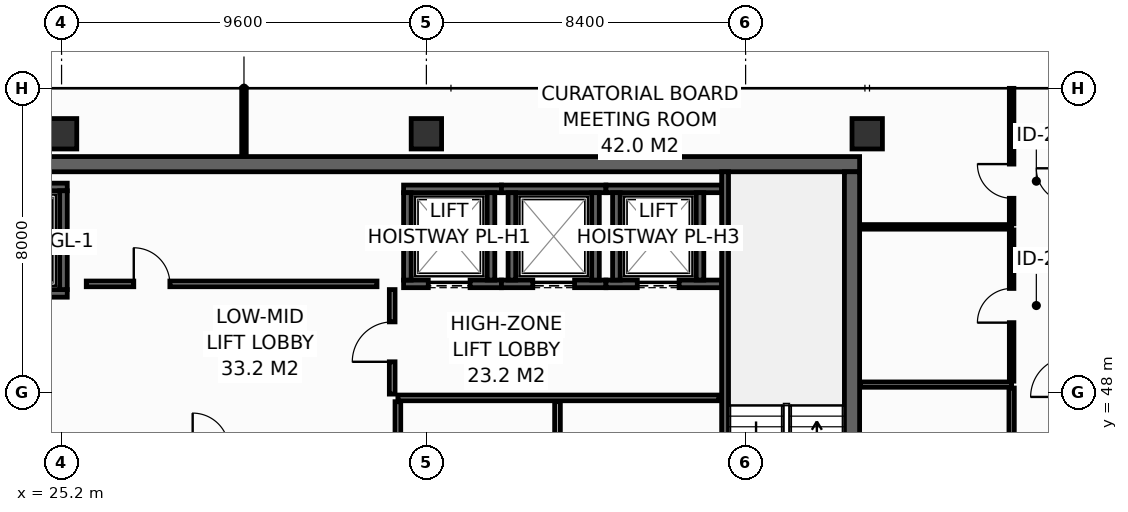
"""IFC4 building model, lengths in metres.
Left out: names, types, materials, properties, quantities, classifications, styles, units other than length and angle.
Written with IfcOpenShell. Run it as: python <this file> out.ifc"""

import sys

from ifc_helpers import new_model, si_unit, direction, frame, frame_2d, origin, origin_2d, place, context, subcontext, project, spatial, rectangle, hollow_rectangle, extrude, element, fill, save


model = new_model("IFC4")
c1 = context("Model", 3, precision=1e-05, world=origin(), true_north=direction((0.0, 1.0)))
c2 = subcontext(c1, "Body", "Model", "MODEL_VIEW")
j1 = project(units=[si_unit("LENGTHUNIT", "METRE"), si_unit("PLANEANGLEUNIT", "RADIAN")], contexts=[c1])
p1 = place(None, origin())
s1 = spatial("IfcSite", under=j1, at=p1, CompositionType="ELEMENT")
p2 = place(p1, origin())
s2 = spatial("IfcBuilding", under=s1, at=p2, CompositionType="ELEMENT")
p3 = place(p2, frame((0.0, 0.0, 249.6)))
s3 = spatial("IfcBuildingStorey", under=s2, at=p3, CompositionType="ELEMENT", Elevation=249.6)
p4 = place(p3, frame((13.7, 54.0, 0.0), z_axis=(0.0, 0.0, 1.0), x_axis=(1.0, 0.0, 0.0)))
e1 = element("IfcWall", 1, at=p4, inside=s3, PredefinedType="SHEAR", context=c2, shape_type="SweptSolid", body=[
    extrude(rectangle(XDim=32.5, YDim=0.4, at=frame_2d((16.25, 0.0))), origin(), (0.0, 0.0, 1.0), 3.35),
])
p5 = place(p3, frame((46.0, 43.4, 0.0), z_axis=(0.0, 0.0, 1.0), x_axis=(0.0, 1.0, 0.0)))
e2 = element("IfcWall", 2, at=p5, inside=s3, PredefinedType="SHEAR", context=c2, shape_type="SweptSolid", body=[
    extrude(rectangle(XDim=10.4, YDim=0.4, at=frame_2d((5.2, 0.0))), origin(), (0.0, 0.0, 1.0), 3.35),
])
for number, where, z_axis, x_axis in (
    (3, (25.2, 54.8, 0.0), (0.0, 0.0, 1.0), (1.0, 0.0, 0.0)),
    (4, (34.8, 54.8, 0.0), (0.0, 0.0, 1.0), (1.0, 0.0, 0.0)),
    (5, (46.4, 54.8, 0.0), (0.0, 0.0, 1.0), (1.0, 0.0, 0.0)),
):
    element("IfcColumn", number, at=place(p3, frame(where, z_axis=z_axis, x_axis=x_axis)), inside=s3, PredefinedType="COLUMN", context=c2, shape_type="SweptSolid", body=[
        extrude(hollow_rectangle(XDim=0.8, YDim=0.8, WallThickness=0.036, at=origin_2d()), origin(), (0.0, 0.0, 1.0), 3.8),
    ])
p6 = place(p3, frame((22.5, 50.6, 0.0), z_axis=(0.0, 0.0, 1.0), x_axis=(1.0, 0.0, 0.0)))
e6 = element("IfcWall", 6, at=p6, inside=s3, PredefinedType="SHEAR", context=c2, shape_type="SweptSolid", body=[
    extrude(rectangle(XDim=2.85, YDim=0.2, at=frame_2d((1.425, 0.0))), origin(), (0.0, 0.0, 1.0), 3.35),
])
p7 = place(p6, frame((0.925, 0.0, 0.0)))
e7 = element("IfcOpeningElement", 7, at=p7, cuts=e6, PredefinedType="OPENING", context=c2, shape_type="SweptSolid", body=[
    extrude(rectangle(XDim=1.25, YDim=2.3, at=frame_2d((0.625, 1.15))), frame((0.0, 0.11, 0.0), z_axis=(0.0, -1.0, 0.0), x_axis=(1.0, 0.0, 0.0)), (0.0, 0.0, 1.0), 0.22),
])
p8 = place(p3, frame((22.5, 53.4, 0.0), z_axis=(0.0, 0.0, 1.0), x_axis=(1.0, 0.0, 0.0)))
e8 = element("IfcWall", 8, at=p8, inside=s3, PredefinedType="SHEAR", context=c2, shape_type="SweptSolid", body=[
    extrude(rectangle(XDim=2.85, YDim=0.2, at=frame_2d((1.425, 0.0))), origin(), (0.0, 0.0, 1.0), 3.35),
])
p9 = place(p3, frame((25.25, 50.7, 0.0), z_axis=(0.0, 0.0, 1.0), x_axis=(0.0, 1.0, 0.0)))
e9 = element("IfcWall", 9, at=p9, inside=s3, PredefinedType="SHEAR", context=c2, shape_type="SweptSolid", body=[
    extrude(rectangle(XDim=2.6, YDim=0.2, at=frame_2d((1.3, 0.0))), origin(), (0.0, 0.0, 1.0), 3.35),
])
p10 = place(p3, frame((34.2, 50.85, 0.0), z_axis=(0.0, 0.0, 1.0), x_axis=(1.0, 0.0, 0.0)))
e10 = element("IfcWall", 10, at=p10, inside=s3, PredefinedType="SHEAR", context=c2, shape_type="SweptSolid", body=[
    extrude(rectangle(XDim=2.575, YDim=0.2, at=frame_2d((1.288, 0.0))), origin(), (0.0, 0.0, 1.0), 3.35),
])
p11 = place(p10, frame((0.65, 0.0, 0.0)))
e11 = element("IfcOpeningElement", 11, at=p11, cuts=e10, PredefinedType="OPENING", context=c2, shape_type="SweptSolid", body=[
    extrude(rectangle(XDim=1.1, YDim=2.2, at=frame_2d((0.55, 1.1))), frame((0.0, 0.11, 0.0), z_axis=(0.0, -1.0, 0.0), x_axis=(1.0, 0.0, 0.0)), (0.0, 0.0, 1.0), 0.22),
])
p12 = place(p3, frame((34.2, 53.35, 0.0), z_axis=(0.0, 0.0, 1.0), x_axis=(1.0, 0.0, 0.0)))
e12 = element("IfcWall", 12, at=p12, inside=s3, PredefinedType="SHEAR", context=c2, shape_type="SweptSolid", body=[
    extrude(rectangle(XDim=2.575, YDim=0.2, at=frame_2d((1.288, 0.0))), origin(), (0.0, 0.0, 1.0), 3.35),
])
for number, where, z_axis, x_axis in (
    (13, (34.3, 50.95, 0.0), (0.0, 0.0, 1.0), (0.0, 1.0, 0.0)),
    (14, (36.5, 50.95, 0.0), (0.0, 0.0, 1.0), (0.0, 1.0, 0.0)),
):
    element("IfcWall", number, at=place(p3, frame(where, z_axis=z_axis, x_axis=x_axis)), inside=s3, PredefinedType="SHEAR", context=c2, shape_type="SweptSolid", body=[
        extrude(rectangle(XDim=2.3, YDim=0.2, at=frame_2d((1.15, 0.0))), origin(), (0.0, 0.0, 1.0), 3.35),
    ])
p13 = place(p3, frame((36.775, 50.85, 0.0), z_axis=(0.0, 0.0, 1.0), x_axis=(1.0, 0.0, 0.0)))
e15 = element("IfcWall", 15, at=p13, inside=s3, PredefinedType="SHEAR", context=c2, shape_type="SweptSolid", body=[
    extrude(rectangle(XDim=2.75, YDim=0.2, at=frame_2d((1.375, 0.0))), origin(), (0.0, 0.0, 1.0), 3.35),
])
p14 = place(p13, frame((0.825, 0.0, 0.0)))
e16 = element("IfcOpeningElement", 16, at=p14, cuts=e15, PredefinedType="OPENING", context=c2, shape_type="SweptSolid", body=[
    extrude(rectangle(XDim=1.1, YDim=2.2, at=frame_2d((0.55, 1.1))), frame((0.0, 0.11, 0.0), z_axis=(0.0, -1.0, 0.0), x_axis=(1.0, 0.0, 0.0)), (0.0, 0.0, 1.0), 0.22),
])
p15 = place(p3, frame((36.775, 53.35, 0.0), z_axis=(0.0, 0.0, 1.0), x_axis=(1.0, 0.0, 0.0)))
e17 = element("IfcWall", 17, at=p15, inside=s3, PredefinedType="SHEAR", context=c2, shape_type="SweptSolid", body=[
    extrude(rectangle(XDim=2.75, YDim=0.2, at=frame_2d((1.375, 0.0))), origin(), (0.0, 0.0, 1.0), 3.35),
])
for number, where, z_axis, x_axis in (
    (18, (37.05, 50.95, 0.0), (0.0, 0.0, 1.0), (0.0, 1.0, 0.0)),
    (19, (39.25, 50.95, 0.0), (0.0, 0.0, 1.0), (0.0, 1.0, 0.0)),
):
    element("IfcWall", number, at=place(p3, frame(where, z_axis=z_axis, x_axis=x_axis)), inside=s3, PredefinedType="SHEAR", context=c2, shape_type="SweptSolid", body=[
        extrude(rectangle(XDim=2.3, YDim=0.2, at=frame_2d((1.15, 0.0))), origin(), (0.0, 0.0, 1.0), 3.35),
    ])
p16 = place(p3, frame((39.525, 50.85, 0.0), z_axis=(0.0, 0.0, 1.0), x_axis=(1.0, 0.0, 0.0)))
e20 = element("IfcWall", 20, at=p16, inside=s3, PredefinedType="SHEAR", context=c2, shape_type="SweptSolid", body=[
    extrude(rectangle(XDim=3.045, YDim=0.2, at=frame_2d((1.522, 0.0))), origin(), (0.0, 0.0, 1.0), 3.35),
])
p17 = place(p16, frame((0.825, 0.0, 0.0)))
e21 = element("IfcOpeningElement", 21, at=p17, cuts=e20, PredefinedType="OPENING", context=c2, shape_type="SweptSolid", body=[
    extrude(rectangle(XDim=1.1, YDim=2.2, at=frame_2d((0.55, 1.1))), frame((0.0, 0.11, 0.0), z_axis=(0.0, -1.0, 0.0), x_axis=(1.0, 0.0, 0.0)), (0.0, 0.0, 1.0), 0.22),
])
p18 = place(p3, frame((39.525, 53.35, 0.0), z_axis=(0.0, 0.0, 1.0), x_axis=(1.0, 0.0, 0.0)))
e22 = element("IfcWall", 22, at=p18, inside=s3, PredefinedType="SHEAR", context=c2, shape_type="SweptSolid", body=[
    extrude(rectangle(XDim=3.045, YDim=0.2, at=frame_2d((1.522, 0.0))), origin(), (0.0, 0.0, 1.0), 3.35),
])
for number, where, z_axis, x_axis in (
    (23, (39.8, 50.95, 0.0), (0.0, 0.0, 1.0), (0.0, 1.0, 0.0)),
    (24, (42.0, 50.95, 0.0), (0.0, 0.0, 1.0), (0.0, 1.0, 0.0)),
):
    element("IfcWall", number, at=place(p3, frame(where, z_axis=z_axis, x_axis=x_axis)), inside=s3, PredefinedType="SHEAR", context=c2, shape_type="SweptSolid", body=[
        extrude(rectangle(XDim=2.3, YDim=0.2, at=frame_2d((1.15, 0.0))), origin(), (0.0, 0.0, 1.0), 3.35),
    ])
p19 = place(p3, frame((42.66, 53.8, 0.0), z_axis=(0.0, 0.0, 1.0), x_axis=(0.0, -1.0, 0.0)))
e25 = element("IfcWall", 25, at=p19, inside=s3, PredefinedType="SHEAR", context=c2, shape_type="SweptSolid", body=[
    extrude(rectangle(XDim=10.4, YDim=0.18, at=frame_2d((5.2, 0.0))), origin(), (0.0, 0.0, 1.0), 3.35),
])
p20 = place(p19, frame((8.99, 0.0, 0.0)))
e26 = element("IfcOpeningElement", 26, at=p20, cuts=e25, PredefinedType="OPENING", context=c2, shape_type="SweptSolid", body=[
    extrude(rectangle(XDim=1.1, YDim=2.15, at=frame_2d((0.55, 1.075))), frame((0.0, 0.1, 0.0), z_axis=(0.0, -1.0, 0.0), x_axis=(1.0, 0.0, 0.0)), (0.0, 0.0, 1.0), 0.2),
])
p21 = place(p3, frame((33.9, 47.95, 0.0), z_axis=(0.0, 0.0, 1.0), x_axis=(0.0, 1.0, 0.0)))
e27 = element("IfcWall", 27, at=p21, inside=s3, PredefinedType="PARTITIONING", context=c2, shape_type="SweptSolid", body=[
    extrude(rectangle(XDim=2.75, YDim=0.15, at=frame_2d((1.375, 0.0))), origin(), (0.0, 0.0, 1.0), 3.35),
])
p22 = place(p21, frame((0.85, 0.0, 0.0)))
e28 = element("IfcOpeningElement", 28, at=p22, cuts=e27, PredefinedType="OPENING", context=c2, shape_type="SweptSolid", body=[
    extrude(rectangle(XDim=1.05, YDim=2.15, at=frame_2d((0.525, 1.075))), frame((0.0, 0.085, 0.0), z_axis=(0.0, -1.0, 0.0), x_axis=(1.0, 0.0, 0.0)), (0.0, 0.0, 1.0), 0.17),
])
p23 = place(p3, frame((34.05, 47.85, 0.0), z_axis=(0.0, 0.0, 1.0), x_axis=(1.0, 0.0, 0.0)))
e29 = element("IfcWall", 29, at=p23, inside=s3, PredefinedType="PARTITIONING", context=c2, shape_type="SweptSolid", body=[
    extrude(rectangle(XDim=8.45, YDim=0.15, at=frame_2d((4.225, 0.0))), origin(), (0.0, 0.0, 1.0), 3.35),
])
for number, where, z_axis, x_axis in (
    (30, (38.25, 45.22, 0.0), (0.0, 0.0, 1.0), (0.0, 1.0, 0.0)),
    (31, (34.05, 45.22, 0.0), (0.0, 0.0, 1.0), (0.0, 1.0, 0.0)),
):
    element("IfcWall", number, at=place(p3, frame(where, z_axis=z_axis, x_axis=x_axis)), inside=s3, PredefinedType="PARTITIONING", context=c2, shape_type="SweptSolid", body=[
        extrude(rectangle(XDim=2.53, YDim=0.15, at=frame_2d((1.265, 0.0))), origin(), (0.0, 0.0, 1.0), 3.35),
    ])
p24 = place(p3, frame((25.85, 50.85, 0.0), z_axis=(0.0, 0.0, 1.0), x_axis=(1.0, 0.0, 0.0)))
e32 = element("IfcWall", 32, at=p24, inside=s3, PredefinedType="PARTITIONING", context=c2, shape_type="SweptSolid", body=[
    extrude(rectangle(XDim=7.65, YDim=0.15, at=frame_2d((3.825, 0.0))), origin(), (0.0, 0.0, 1.0), 3.35),
])
p25 = place(p24, frame((1.25, 0.0, 0.0)))
e33 = element("IfcOpeningElement", 33, at=p25, cuts=e32, PredefinedType="OPENING", context=c2, shape_type="SweptSolid", body=[
    extrude(rectangle(XDim=0.95, YDim=2.15, at=frame_2d((0.475, 1.075))), frame((0.0, 0.085, 0.0), z_axis=(0.0, -1.0, 0.0), x_axis=(1.0, 0.0, 0.0)), (0.0, 0.0, 1.0), 0.17),
])
p26 = place(p3, frame((46.22, 48.2, 0.0), z_axis=(0.0, 0.0, 1.0), x_axis=(1.0, 0.0, 0.0)))
e34 = element("IfcWall", 34, at=p26, inside=s3, PredefinedType="PARTITIONING", context=c2, shape_type="SweptSolid", body=[
    extrude(rectangle(XDim=3.98, YDim=0.14, at=frame_2d((1.99, 0.0))), origin(), (0.0, 0.0, 1.0), 3.35),
])
p27 = place(p3, frame((50.2, 41.24, 0.0), z_axis=(0.0, 0.0, 1.0), x_axis=(0.0, 1.0, 0.0)))
e35 = element("IfcWall", 35, at=p27, inside=s3, PredefinedType="PARTITIONING", context=c2, shape_type="SweptSolid", body=[
    extrude(rectangle(XDim=6.87, YDim=0.14, at=frame_2d((3.435, 0.0))), origin(), (0.0, 0.0, 1.0), 2.747),
])
p28 = place(p27, frame((2.985, 0.0, 0.0)))
e36 = element("IfcOpeningElement", 36, at=p28, cuts=e35, PredefinedType="OPENING", context=c2, shape_type="SweptSolid", body=[
    extrude(rectangle(XDim=0.9, YDim=2.1, at=frame_2d((0.45, 1.05))), frame((0.0, 0.08, 0.0), z_axis=(0.0, -1.0, 0.0), x_axis=(1.0, 0.0, 0.0)), (0.0, 0.0, 1.0), 0.16),
])
p29 = place(p3, frame((46.22, 52.35, 0.0), z_axis=(0.0, 0.0, 1.0), x_axis=(1.0, 0.0, 0.0)))
e37 = element("IfcWall", 37, at=p29, inside=s3, PredefinedType="PARTITIONING", context=c2, shape_type="SweptSolid", body=[
    extrude(rectangle(XDim=3.98, YDim=0.12, at=frame_2d((1.99, 0.0))), origin(), (0.0, 0.0, 1.0), 3.35),
])
p30 = place(p3, frame((30.0, 54.22, 0.0), z_axis=(0.0, 0.0, 1.0), x_axis=(0.0, 1.0, 0.0)))
e38 = element("IfcWall", 38, at=p30, inside=s3, PredefinedType="PARTITIONING", context=c2, shape_type="SweptSolid", body=[
    extrude(rectangle(XDim=1.775, YDim=0.12, at=frame_2d((0.888, 0.0))), origin(), (0.0, 0.0, 1.0), 2.735),
])
p31 = place(p3, frame((50.2, 48.29, 0.0), z_axis=(0.0, 0.0, 1.0), x_axis=(0.0, 1.0, 0.0)))
e39 = element("IfcWall", 39, at=p31, inside=s3, PredefinedType="PARTITIONING", context=c2, shape_type="SweptSolid", body=[
    extrude(rectangle(XDim=3.98, YDim=0.12, at=frame_2d((1.99, 0.0))), origin(), (0.0, 0.0, 1.0), 3.35),
])
p32 = place(p31, frame((1.54, 0.0, 0.0)))
e40 = element("IfcOpeningElement", 40, at=p32, cuts=e39, PredefinedType="OPENING", context=c2, shape_type="SweptSolid", body=[
    extrude(rectangle(XDim=0.9, YDim=2.1, at=frame_2d((0.45, 1.05))), frame((0.0, 0.07, 0.0), z_axis=(0.0, -1.0, 0.0), x_axis=(1.0, 0.0, 0.0)), (0.0, 0.0, 1.0), 0.14),
])
p33 = place(p3, frame((50.2, 52.43, 0.0), z_axis=(0.0, 0.0, 1.0), x_axis=(0.0, 1.0, 0.0)))
e41 = element("IfcWall", 41, at=p33, inside=s3, PredefinedType="PARTITIONING", context=c2, shape_type="SweptSolid", body=[
    extrude(rectangle(XDim=3.565, YDim=0.12, at=frame_2d((1.783, 0.0))), origin(), (0.0, 0.0, 1.0), 2.735),
])
p34 = place(p33, frame((0.672, 0.0, 0.0)))
e42 = element("IfcOpeningElement", 42, at=p34, cuts=e41, PredefinedType="OPENING", context=c2, shape_type="SweptSolid", body=[
    extrude(rectangle(XDim=0.9, YDim=2.1, at=frame_2d((0.45, 1.05))), frame((0.0, 0.07, 0.0), z_axis=(0.0, -1.0, 0.0), x_axis=(1.0, 0.0, 0.0)), (0.0, 0.0, 1.0), 0.14),
])
p35 = place(p11, origin())
e43 = element("IfcDoor", 43, at=p35, inside=s3, OperationType="SLIDING_TO_LEFT", PredefinedType="DOOR", context=c2, shape_type="SweptSolid", body=[
    extrude(rectangle(XDim=1.1, YDim=2.2, at=frame_2d((0.55, 1.1))), frame((0.0, 0.025, 0.0), z_axis=(0.0, -1.0, 0.0), x_axis=(1.0, 0.0, 0.0)), (0.0, 0.0, 1.0), 0.05),
])
fill(e11, e43)
p36 = place(p14, origin())
e44 = element("IfcDoor", 44, at=p36, inside=s3, OperationType="SLIDING_TO_LEFT", PredefinedType="DOOR", context=c2, shape_type="SweptSolid", body=[
    extrude(rectangle(XDim=1.1, YDim=2.2, at=frame_2d((0.55, 1.1))), frame((0.0, 0.025, 0.0), z_axis=(0.0, -1.0, 0.0), x_axis=(1.0, 0.0, 0.0)), (0.0, 0.0, 1.0), 0.05),
])
fill(e16, e44)
p37 = place(p17, origin())
e45 = element("IfcDoor", 45, at=p37, inside=s3, OperationType="SLIDING_TO_LEFT", PredefinedType="DOOR", context=c2, shape_type="SweptSolid", body=[
    extrude(rectangle(XDim=1.1, YDim=2.2, at=frame_2d((0.55, 1.1))), frame((0.0, 0.025, 0.0), z_axis=(0.0, -1.0, 0.0), x_axis=(1.0, 0.0, 0.0)), (0.0, 0.0, 1.0), 0.05),
])
fill(e21, e45)
p38 = place(p22, origin())
e46 = element("IfcDoor", 46, at=p38, inside=s3, OperationType="SINGLE_SWING_LEFT", PredefinedType="DOOR", context=c2, shape_type="SweptSolid", body=[
    extrude(rectangle(XDim=1.05, YDim=2.15, at=frame_2d((0.525, 1.075))), frame((0.0, 0.025, 0.0), z_axis=(0.0, -1.0, 0.0), x_axis=(1.0, 0.0, 0.0)), (0.0, 0.0, 1.0), 0.05),
])
fill(e28, e46)
p39 = place(p25, origin())
e47 = element("IfcDoor", 47, at=p39, inside=s3, OperationType="SINGLE_SWING_LEFT", PredefinedType="DOOR", context=c2, shape_type="SweptSolid", body=[
    extrude(rectangle(XDim=0.95, YDim=2.15, at=frame_2d((0.475, 1.075))), frame((0.0, 0.025, 0.0), z_axis=(0.0, -1.0, 0.0), x_axis=(1.0, 0.0, 0.0)), (0.0, 0.0, 1.0), 0.05),
])
fill(e33, e47)
p40 = place(p32, origin())
e48 = element("IfcDoor", 48, at=p40, inside=s3, OperationType="SINGLE_SWING_LEFT", PredefinedType="DOOR", context=c2, shape_type="SweptSolid", body=[
    extrude(rectangle(XDim=0.9, YDim=2.1, at=frame_2d((0.45, 1.05))), frame((0.0, 0.025, 0.0), z_axis=(0.0, -1.0, 0.0), x_axis=(1.0, 0.0, 0.0)), (0.0, 0.0, 1.0), 0.05),
])
fill(e40, e48)
p41 = place(p34, origin())
e49 = element("IfcDoor", 49, at=p41, inside=s3, OperationType="SINGLE_SWING_RIGHT", PredefinedType="DOOR", context=c2, shape_type="SweptSolid", body=[
    extrude(rectangle(XDim=0.9, YDim=2.1, at=frame_2d((0.45, 1.05))), frame((0.0, 0.025, 0.0), z_axis=(0.0, -1.0, 0.0), x_axis=(1.0, 0.0, 0.0)), (0.0, 0.0, 1.0), 0.05),
])
fill(e42, e49)
save(model, sys.argv[1])
